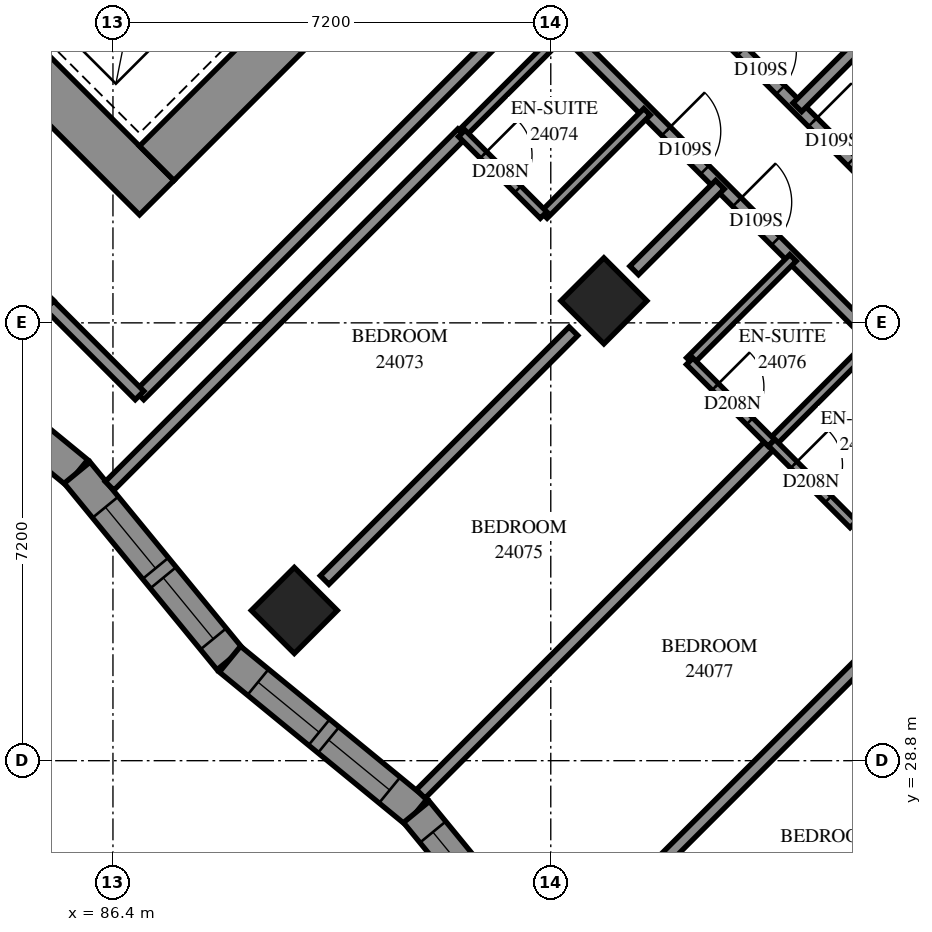
"""IFC4 building model, lengths in metres.
Left out: names, types, materials, properties, quantities, classifications, styles, units other than length and angle.
Written with IfcOpenShell. Run it as: python <this file> out.ifc"""

import sys

from ifc_helpers import new_model, si_unit, direction, frame, frame_2d, origin, origin_2d, place, context, subcontext, project, spatial, polyline, rectangle, outline, extrude, element, fill, save


model = new_model("IFC4")
c1 = context("Model", 3, precision=1e-05, world=origin(), true_north=direction((0.0, 1.0)))
c2 = subcontext(c1, "Body", "Model", "MODEL_VIEW")
j1 = project(units=[si_unit("LENGTHUNIT", "METRE"), si_unit("PLANEANGLEUNIT", "RADIAN")], contexts=[c1])
p1 = place(None, origin())
s1 = spatial("IfcSite", under=j1, at=p1, CompositionType="ELEMENT")
p2 = place(p1, origin())
s2 = spatial("IfcBuilding", under=s1, at=p2, CompositionType="ELEMENT")
p3 = place(p2, frame((0.0, 0.0, 91.4)))
s3 = spatial("IfcBuildingStorey", under=s2, at=p3, CompositionType="ELEMENT", Elevation=91.4)
for number, where, z_axis, x_axis in (
    (1, (94.474, 36.362, 0.0), (0.0, 0.0, 1.0), (0.707, -0.707, 0.0)),
    (2, (89.382, 31.271, 0.0), (0.0, 0.0, 1.0), (0.707, -0.707, 0.0)),
):
    element("IfcColumn", number, at=place(p3, frame(where, z_axis=z_axis, x_axis=x_axis)), inside=s3, PredefinedType="COLUMN", context=c2, shape_type="SweptSolid", body=[
        extrude(rectangle(XDim=1.0, YDim=1.0, at=origin_2d()), origin(), (0.0, 0.0, 1.0), 3.1),
    ])
p4 = place(p3, frame((75.806, 49.373, -0.3), z_axis=(0.0, 0.0, 1.0), x_axis=(0.7071067812, -0.7071067812, 0.0)))
e3 = element("IfcWall", 3, at=p4, inside=s3, PredefinedType="SHEAR", context=c2, shape_type="SweptSolid", body=[
    extrude(rectangle(XDim=16.0, YDim=0.8, at=frame_2d((8.0, 0.0))), origin(), (0.0, 0.0, 1.0), 2.7),
])
p5 = place(p3, frame((87.12, 38.625, -0.3), z_axis=(0.0, 0.0, 1.0), x_axis=(0.7071067812, 0.7071067812, 0.0)))
e4 = element("IfcWall", 4, at=p5, inside=s3, PredefinedType="SHEAR", context=c2, shape_type="SweptSolid", body=[
    extrude(rectangle(XDim=14.4, YDim=0.8, at=frame_2d((7.2, 0.0))), origin(), (0.0, 0.0, 1.0), 2.7),
])
p6 = place(p5, frame((4.55, 0.0, 0.3)))
e5 = element("IfcOpeningElement", 5, at=p6, cuts=e4, PredefinedType="OPENING", context=c2, shape_type="SweptSolid", body=[
    extrude(rectangle(XDim=1.1, YDim=2.1, at=frame_2d((0.55, 1.05))), frame((0.0, 0.41, 0.0), z_axis=(0.0, -1.0, 0.0), x_axis=(1.0, 0.0, 0.0)), (0.0, 0.0, 1.0), 0.82),
])
p7 = place(p5, frame((11.35, 0.0, 0.3)))
e6 = element("IfcOpeningElement", 6, at=p7, cuts=e4, PredefinedType="OPENING", context=c2, shape_type="SweptSolid", body=[
    extrude(rectangle(XDim=1.1, YDim=2.1, at=frame_2d((0.55, 1.05))), frame((0.0, 0.41, 0.0), z_axis=(0.0, -1.0, 0.0), x_axis=(1.0, 0.0, 0.0)), (0.0, 0.0, 1.0), 0.82),
])
p8 = place(p3, frame((82.745, 36.049, 0.0), z_axis=(0.0, 0.0, 1.0), x_axis=(0.7733872397, -0.6339338904, 0.0)))
e7 = element("IfcWall", 7, at=p8, inside=s3, PredefinedType="SOLIDWALL", context=c2, shape_type="SweptSolid", body=[
    extrude(outline(polyline([(-0.027, -0.275), (3.938, -0.275), (3.992, 0.275), (0.027, 0.275), (-0.027, -0.275)])), origin(), (0.0, 0.0, 1.0), 3.1),
])
p9 = place(p8, frame((1.721, 0.0, 0.5)))
e8 = element("IfcOpeningElement", 8, at=p9, cuts=e7, PredefinedType="OPENING", context=c2, shape_type="SweptSolid", body=[
    extrude(rectangle(XDim=1.2, YDim=2.45, at=frame_2d((0.6, 1.225))), frame((0.0, 0.285, 0.0), z_axis=(0.0, -1.0, 0.0), x_axis=(1.0, 0.0, 0.0)), (0.0, 0.0, 1.0), 0.57),
])
p10 = place(p3, frame((85.811, 33.536, 0.0), z_axis=(0.0, 0.0, 1.0), x_axis=(0.6339462564, -0.7733771033, 0.0)))
e9 = element("IfcWall", 9, at=p10, inside=s3, PredefinedType="SOLIDWALL", context=c2, shape_type="SweptSolid", body=[
    extrude(outline(polyline([(0.027, -0.275), (3.992, -0.275), (3.938, 0.275), (-0.027, 0.275), (0.027, -0.275)])), origin(), (0.0, 0.0, 1.0), 3.1),
])
p11 = place(p10, frame((0.734, 0.0, 0.5)))
e10 = element("IfcOpeningElement", 10, at=p11, cuts=e9, PredefinedType="OPENING", context=c2, shape_type="SweptSolid", body=[
    extrude(rectangle(XDim=1.3, YDim=2.45, at=frame_2d((0.65, 1.225))), frame((0.0, 0.285, 0.0), z_axis=(0.0, -1.0, 0.0), x_axis=(1.0, 0.0, 0.0)), (0.0, 0.0, 1.0), 0.57),
])
p12 = place(p10, frame((2.233, 0.0, 0.5)))
e11 = element("IfcOpeningElement", 11, at=p12, cuts=e9, PredefinedType="OPENING", context=c2, shape_type="SweptSolid", body=[
    extrude(rectangle(XDim=1.3, YDim=2.45, at=frame_2d((0.65, 1.225))), frame((0.0, 0.285, 0.0), z_axis=(0.0, -1.0, 0.0), x_axis=(1.0, 0.0, 0.0)), (0.0, 0.0, 1.0), 0.57),
])
p13 = place(p3, frame((88.324, 30.47, 0.0), z_axis=(0.0, 0.0, 1.0), x_axis=(0.7733872397, -0.6339338904, 0.0)))
e12 = element("IfcWall", 12, at=p13, inside=s3, PredefinedType="SOLIDWALL", context=c2, shape_type="SweptSolid", body=[
    extrude(outline(polyline([(-0.027, -0.275), (3.938, -0.275), (3.992, 0.275), (0.027, 0.275), (-0.027, -0.275)])), origin(), (0.0, 0.0, 1.0), 3.1),
])
p14 = place(p13, frame((0.596, 0.0, 0.5)))
e13 = element("IfcOpeningElement", 13, at=p14, cuts=e12, PredefinedType="OPENING", context=c2, shape_type="SweptSolid", body=[
    extrude(rectangle(XDim=1.3, YDim=2.45, at=frame_2d((0.65, 1.225))), frame((0.0, 0.285, 0.0), z_axis=(0.0, -1.0, 0.0), x_axis=(1.0, 0.0, 0.0)), (0.0, 0.0, 1.0), 0.57),
])
p15 = place(p13, frame((2.096, 0.0, 0.5)))
e14 = element("IfcOpeningElement", 14, at=p15, cuts=e12, PredefinedType="OPENING", context=c2, shape_type="SweptSolid", body=[
    extrude(rectangle(XDim=1.3, YDim=2.45, at=frame_2d((0.65, 1.225))), frame((0.0, 0.285, 0.0), z_axis=(0.0, -1.0, 0.0), x_axis=(1.0, 0.0, 0.0)), (0.0, 0.0, 1.0), 0.57),
])
p16 = place(p3, frame((91.391, 27.956, 0.0), z_axis=(0.0, 0.0, 1.0), x_axis=(0.633918804, -0.7733996056, 0.0)))
e15 = element("IfcWall", 15, at=p16, inside=s3, PredefinedType="SOLIDWALL", context=c2, shape_type="SweptSolid", body=[
    extrude(outline(polyline([(0.027, -0.275), (3.992, -0.275), (3.938, 0.275), (-0.027, 0.275), (0.027, -0.275)])), origin(), (0.0, 0.0, 1.0), 3.1),
])
p17 = place(p16, frame((0.426, 0.0, 0.5)))
e16 = element("IfcOpeningElement", 16, at=p17, cuts=e15, PredefinedType="OPENING", context=c2, shape_type="SweptSolid", body=[
    extrude(rectangle(XDim=1.3, YDim=2.45, at=frame_2d((0.65, 1.225))), frame((0.0, 0.285, 0.0), z_axis=(0.0, -1.0, 0.0), x_axis=(1.0, 0.0, 0.0)), (0.0, 0.0, 1.0), 0.57),
])
p18 = place(p16, frame((1.927, 0.0, 0.5)))
e17 = element("IfcOpeningElement", 17, at=p18, cuts=e15, PredefinedType="OPENING", context=c2, shape_type="SweptSolid", body=[
    extrude(rectangle(XDim=1.3, YDim=2.45, at=frame_2d((0.65, 1.225))), frame((0.0, 0.285, 0.0), z_axis=(0.0, -1.0, 0.0), x_axis=(1.0, 0.0, 0.0)), (0.0, 0.0, 1.0), 0.57),
])
p19 = place(p3, frame((93.339, 41.309, 0.0), z_axis=(0.0, 0.0, 1.0), x_axis=(0.7071067812, -0.7071067812, 0.0)))
e18 = element("IfcWall", 18, at=p19, inside=s3, PredefinedType="PARTITIONING", context=c2, shape_type="SweptSolid", body=[
    extrude(rectangle(XDim=18.702, YDim=0.2, at=frame_2d((9.351, 0.0))), origin(), (0.0, 0.0, 1.0), 3.1),
])
p20 = place(p19, frame((3.05, 0.0, 0.0)))
e19 = element("IfcOpeningElement", 19, at=p20, cuts=e18, PredefinedType="OPENING", context=c2, shape_type="SweptSolid", body=[
    extrude(rectangle(XDim=0.9, YDim=2.1, at=frame_2d((0.45, 1.05))), frame((0.0, 0.11, 0.0), z_axis=(0.0, -1.0, 0.0), x_axis=(1.0, 0.0, 0.0)), (0.0, 0.0, 1.0), 0.22),
])
p21 = place(p19, frame((4.7, 0.0, 0.0)))
e20 = element("IfcOpeningElement", 20, at=p21, cuts=e18, PredefinedType="OPENING", context=c2, shape_type="SweptSolid", body=[
    extrude(rectangle(XDim=0.9, YDim=2.1, at=frame_2d((0.45, 1.05))), frame((0.0, 0.11, 0.0), z_axis=(0.0, -1.0, 0.0), x_axis=(1.0, 0.0, 0.0)), (0.0, 0.0, 1.0), 0.22),
])
p22 = place(p19, frame((10.149, 0.0, 0.0)))
e21 = element("IfcOpeningElement", 21, at=p22, cuts=e18, PredefinedType="OPENING", context=c2, shape_type="SweptSolid", body=[
    extrude(rectangle(XDim=0.9, YDim=2.1, at=frame_2d((0.45, 1.05))), frame((0.0, 0.11, 0.0), z_axis=(0.0, -1.0, 0.0), x_axis=(1.0, 0.0, 0.0)), (0.0, 0.0, 1.0), 0.22),
])
p23 = place(p19, frame((11.9, 0.0, 0.0)))
e22 = element("IfcOpeningElement", 22, at=p23, cuts=e18, PredefinedType="OPENING", context=c2, shape_type="SweptSolid", body=[
    extrude(rectangle(XDim=0.9, YDim=2.1, at=frame_2d((0.45, 1.05))), frame((0.0, 0.11, 0.0), z_axis=(0.0, -1.0, 0.0), x_axis=(1.0, 0.0, 0.0)), (0.0, 0.0, 1.0), 0.22),
])
p24 = place(p19, frame((17.45, 0.0, 0.0)))
e23 = element("IfcOpeningElement", 23, at=p24, cuts=e18, PredefinedType="OPENING", context=c2, shape_type="SweptSolid", body=[
    extrude(rectangle(XDim=0.9, YDim=2.1, at=frame_2d((0.45, 1.05))), frame((0.0, 0.11, 0.0), z_axis=(0.0, -1.0, 0.0), x_axis=(1.0, 0.0, 0.0)), (0.0, 0.0, 1.0), 0.22),
])
p25 = place(p3, frame((86.835, 34.806, 0.0), z_axis=(0.0, 0.0, 1.0), x_axis=(0.7071067812, 0.7071067812, 0.0)))
e24 = element("IfcWall", 24, at=p25, inside=s3, PredefinedType="PARTITIONING", context=c2, shape_type="SweptSolid", body=[
    extrude(rectangle(XDim=9.201, YDim=0.2, at=frame_2d((4.601, 0.0))), origin(), (0.0, 0.0, 1.0), 3.1),
])
p26 = place(p3, frame((96.501, 23.117, 0.0), z_axis=(0.0, 0.0, 1.0), x_axis=(0.7071128537, 0.7071007086, 0.0)))
e25 = element("IfcWall", 25, at=p26, inside=s3, PredefinedType="PARTITIONING", context=c2, shape_type="SweptSolid", body=[
    extrude(rectangle(XDim=8.234, YDim=0.2, at=frame_2d((4.117, 0.0))), origin(), (0.0, 0.0, 1.0), 3.1),
])
p27 = place(p3, frame((86.345, 33.319, 0.0), z_axis=(0.0, 0.0, 1.0), x_axis=(0.7069848221, 0.7072287193, 0.0)))
e26 = element("IfcWall", 26, at=p27, inside=s3, PredefinedType="PARTITIONING", context=c2, shape_type="SweptSolid", body=[
    extrude(rectangle(XDim=8.2, YDim=0.2, at=frame_2d((4.1, 0.0))), origin(), (0.0, 0.0, 1.0), 3.1),
])
p28 = place(p3, frame((91.462, 28.254, 0.0), z_axis=(0.0, 0.0, 1.0), x_axis=(0.7072292685, 0.7069842727, 0.0)))
e27 = element("IfcWall", 27, at=p28, inside=s3, PredefinedType="PARTITIONING", context=c2, shape_type="SweptSolid", body=[
    extrude(rectangle(XDim=8.163, YDim=0.2, at=frame_2d((4.082, 0.0))), origin(), (0.0, 0.0, 1.0), 3.1),
])
p29 = place(p3, frame((94.62, 42.587, 0.0), z_axis=(0.0, 0.0, 1.0), x_axis=(0.7071067812, -0.7071067812, 0.0)))
e28 = element("IfcWall", 28, at=p29, inside=s3, PredefinedType="PARTITIONING", context=c2, shape_type="SweptSolid", body=[
    extrude(rectangle(XDim=7.9, YDim=0.2, at=frame_2d((3.95, 0.0))), origin(), (0.0, 0.0, 1.0), 3.1),
])
p30 = place(p29, frame((2.998, 0.0, 0.0)))
e29 = element("IfcOpeningElement", 29, at=p30, cuts=e28, PredefinedType="OPENING", context=c2, shape_type="SweptSolid", body=[
    extrude(rectangle(XDim=0.9, YDim=2.1, at=frame_2d((0.45, 1.05))), frame((0.0, 0.11, 0.0), z_axis=(0.0, -1.0, 0.0), x_axis=(1.0, 0.0, 0.0)), (0.0, 0.0, 1.0), 0.22),
])
p31 = place(p29, frame((4.649, 0.0, 0.0)))
e30 = element("IfcOpeningElement", 30, at=p31, cuts=e28, PredefinedType="OPENING", context=c2, shape_type="SweptSolid", body=[
    extrude(rectangle(XDim=0.9, YDim=2.1, at=frame_2d((0.45, 1.05))), frame((0.0, 0.11, 0.0), z_axis=(0.0, -1.0, 0.0), x_axis=(1.0, 0.0, 0.0)), (0.0, 0.0, 1.0), 0.22),
])
p32 = place(p3, frame((89.881, 31.771, 0.0), z_axis=(0.0, 0.0, 1.0), x_axis=(0.7071067812, 0.7071067812, 0.0)))
e31 = element("IfcWall", 31, at=p32, inside=s3, PredefinedType="PARTITIONING", context=c2, shape_type="SweptSolid", body=[
    extrude(rectangle(XDim=5.787, YDim=0.2, at=frame_2d((2.893, 0.0))), origin(), (0.0, 0.0, 1.0), 3.1),
])
p33 = place(p3, frame((94.973, 26.681, 0.0), z_axis=(0.0, 0.0, 1.0), x_axis=(0.7071067812, 0.7071067812, 0.0)))
e32 = element("IfcWall", 32, at=p33, inside=s3, PredefinedType="PARTITIONING", context=c2, shape_type="SweptSolid", body=[
    extrude(rectangle(XDim=5.784, YDim=0.2, at=frame_2d((2.892, 0.0))), origin(), (0.0, 0.0, 1.0), 3.1),
])
p34 = place(p3, frame((98.573, 32.685, 0.0), z_axis=(0.0, 0.0, 1.0), x_axis=(0.7071067812, 0.7071067812, 0.0)))
e33 = element("IfcWall", 33, at=p34, inside=s3, PredefinedType="PARTITIONING", context=c2, shape_type="SweptSolid", body=[
    extrude(rectangle(XDim=2.401, YDim=0.15, at=frame_2d((1.201, 0.0))), origin(), (0.0, 0.0, 1.0), 3.1),
])
for number, where, z_axis, x_axis in (
    (34, (92.143, 39.117, 0.0), (0.0, 0.0, 1.0), (0.708, 0.707, 0.0)),
    (35, (93.487, 37.773, 0.0), (0.0, 0.0, 1.0), (0.707, 0.708, 0.0)),
    (36, (97.234, 34.026, 0.0), (0.0, 0.0, 1.0), (0.707, 0.708, 0.0)),
):
    element("IfcWall", number, at=place(p3, frame(where, z_axis=z_axis, x_axis=x_axis)), inside=s3, PredefinedType="PARTITIONING", context=c2, shape_type="SweptSolid", body=[
        extrude(rectangle(XDim=2.4, YDim=0.15, at=frame_2d((1.2, 0.0))), origin(), (0.0, 0.0, 1.0), 3.1),
    ])
p35 = place(p3, frame((95.887, 35.373, 0.0), z_axis=(0.0, 0.0, 1.0), x_axis=(0.7071067812, 0.7071067812, 0.0)))
e37 = element("IfcWall", 37, at=p35, inside=s3, PredefinedType="PARTITIONING", context=c2, shape_type="SweptSolid", body=[
    extrude(rectangle(XDim=2.398, YDim=0.15, at=frame_2d((1.199, 0.0))), origin(), (0.0, 0.0, 1.0), 3.1),
])
p36 = place(p3, frame((85.353, 36.293, 0.0), z_axis=(0.0, 0.0, 1.0), x_axis=(0.7066304548, -0.7075827869, 0.0)))
e38 = element("IfcWall", 38, at=p36, inside=s3, PredefinedType="PARTITIONING", context=c2, shape_type="SweptSolid", body=[
    extrude(rectangle(XDim=2.1, YDim=0.2, at=frame_2d((1.05, 0.0))), origin(), (0.0, 0.0, 1.0), 3.1),
])
for number, where, z_axis, x_axis in (
    (39, (97.655, 39.545, 0.0), (0.0, 0.0, 1.0), (0.707, 0.707, 0.0)),
    (40, (94.972, 36.862, 0.0), (0.0, 0.0, 1.0), (0.707, 0.707, 0.0)),
):
    element("IfcWall", number, at=place(p3, frame(where, z_axis=z_axis, x_axis=x_axis)), inside=s3, PredefinedType="PARTITIONING", context=c2, shape_type="SweptSolid", body=[
        extrude(rectangle(XDim=1.994, YDim=0.2, at=frame_2d((0.997, 0.0))), origin(), (0.0, 0.0, 1.0), 3.1),
    ])
p37 = place(p3, frame((95.885, 35.369, 0.0), z_axis=(0.0, 0.0, 1.0), x_axis=(0.7071067812, -0.7071067812, 0.0)))
e41 = element("IfcWall", 41, at=p37, inside=s3, PredefinedType="PARTITIONING", context=c2, shape_type="SweptSolid", body=[
    extrude(rectangle(XDim=1.901, YDim=0.15, at=frame_2d((0.95, 0.0))), origin(), (0.0, 0.0, 1.0), 3.1),
])
p38 = place(p37, frame((0.595, 0.0, 0.0)))
e42 = element("IfcOpeningElement", 42, at=p38, cuts=e41, PredefinedType="OPENING", context=c2, shape_type="SweptSolid", body=[
    extrude(rectangle(XDim=0.8, YDim=2.1, at=frame_2d((0.4, 1.05))), frame((0.0, 0.085, 0.0), z_axis=(0.0, -1.0, 0.0), x_axis=(1.0, 0.0, 0.0)), (0.0, 0.0, 1.0), 0.17),
])
p39 = place(p3, frame((92.137, 39.117, 0.0), z_axis=(0.0, 0.0, 1.0), x_axis=(0.7071067812, -0.7071067812, 0.0)))
e43 = element("IfcWall", 43, at=p39, inside=s3, PredefinedType="PARTITIONING", context=c2, shape_type="SweptSolid", body=[
    extrude(rectangle(XDim=1.901, YDim=0.15, at=frame_2d((0.95, 0.0))), origin(), (0.0, 0.0, 1.0), 3.1),
])
p40 = place(p39, frame((0.502, 0.0, 0.0)))
e44 = element("IfcOpeningElement", 44, at=p40, cuts=e43, PredefinedType="OPENING", context=c2, shape_type="SweptSolid", body=[
    extrude(rectangle(XDim=0.8, YDim=2.1, at=frame_2d((0.4, 1.05))), frame((0.0, 0.085, 0.0), z_axis=(0.0, -1.0, 0.0), x_axis=(1.0, 0.0, 0.0)), (0.0, 0.0, 1.0), 0.17),
])
p41 = place(p3, frame((97.233, 34.029, 0.0), z_axis=(0.0, 0.0, 1.0), x_axis=(0.7065800724, -0.7076330979, 0.0)))
e45 = element("IfcWall", 45, at=p41, inside=s3, PredefinedType="PARTITIONING", context=c2, shape_type="SweptSolid", body=[
    extrude(rectangle(XDim=1.899, YDim=0.15, at=frame_2d((0.95, 0.0))), origin(), (0.0, 0.0, 1.0), 3.1),
])
p42 = place(p41, frame((0.515, 0.0, 0.0)))
e46 = element("IfcOpeningElement", 46, at=p42, cuts=e45, PredefinedType="OPENING", context=c2, shape_type="SweptSolid", body=[
    extrude(rectangle(XDim=0.8, YDim=2.1, at=frame_2d((0.4, 1.05))), frame((0.0, 0.085, 0.0), z_axis=(0.0, -1.0, 0.0), x_axis=(1.0, 0.0, 0.0)), (0.0, 0.0, 1.0), 0.17),
])
p43 = place(p3, frame((84.795, 36.855, 0.0), z_axis=(0.0, 0.0, 1.0), x_axis=(0.7071067812, -0.7071067812, 0.0)))
e47 = element("IfcWall", 47, at=p43, inside=s3, PredefinedType="PARTITIONING", context=c2, shape_type="SweptSolid", body=[
    extrude(rectangle(XDim=0.792, YDim=0.2, at=frame_2d((0.396, 0.0))), origin(), (0.0, 0.0, 1.0), 3.1),
])
p44 = place(p11, origin())
e48 = element("IfcWindow", 48, at=p44, inside=s3, PartitioningType="SINGLE_PANEL", PredefinedType="WINDOW", context=c2, shape_type="SweptSolid", body=[
    extrude(rectangle(XDim=1.3, YDim=2.45, at=frame_2d((0.65, 1.225))), frame((0.0, 0.155, 0.0), z_axis=(0.0, -1.0, 0.0), x_axis=(1.0, 0.0, 0.0)), (0.0, 0.0, 1.0), 0.06),
])
fill(e10, e48)
p45 = place(p12, origin())
e49 = element("IfcWindow", 49, at=p45, inside=s3, PartitioningType="SINGLE_PANEL", PredefinedType="WINDOW", context=c2, shape_type="SweptSolid", body=[
    extrude(rectangle(XDim=1.3, YDim=2.45, at=frame_2d((0.65, 1.225))), frame((0.0, 0.155, 0.0), z_axis=(0.0, -1.0, 0.0), x_axis=(1.0, 0.0, 0.0)), (0.0, 0.0, 1.0), 0.06),
])
fill(e11, e49)
p46 = place(p14, origin())
e50 = element("IfcWindow", 50, at=p46, inside=s3, PartitioningType="SINGLE_PANEL", PredefinedType="WINDOW", context=c2, shape_type="SweptSolid", body=[
    extrude(rectangle(XDim=1.3, YDim=2.45, at=frame_2d((0.65, 1.225))), frame((0.0, 0.155, 0.0), z_axis=(0.0, -1.0, 0.0), x_axis=(1.0, 0.0, 0.0)), (0.0, 0.0, 1.0), 0.06),
])
fill(e13, e50)
p47 = place(p15, origin())
e51 = element("IfcWindow", 51, at=p47, inside=s3, PartitioningType="SINGLE_PANEL", PredefinedType="WINDOW", context=c2, shape_type="SweptSolid", body=[
    extrude(rectangle(XDim=1.3, YDim=2.45, at=frame_2d((0.65, 1.225))), frame((0.0, 0.155, 0.0), z_axis=(0.0, -1.0, 0.0), x_axis=(1.0, 0.0, 0.0)), (0.0, 0.0, 1.0), 0.06),
])
fill(e14, e51)
p48 = place(p17, origin())
e52 = element("IfcWindow", 52, at=p48, inside=s3, PartitioningType="SINGLE_PANEL", PredefinedType="WINDOW", context=c2, shape_type="SweptSolid", body=[
    extrude(rectangle(XDim=1.3, YDim=2.45, at=frame_2d((0.65, 1.225))), frame((0.0, 0.155, 0.0), z_axis=(0.0, -1.0, 0.0), x_axis=(1.0, 0.0, 0.0)), (0.0, 0.0, 1.0), 0.06),
])
fill(e16, e52)
p49 = place(p30, origin())
e53 = element("IfcDoor", 53, at=p49, inside=s3, OperationType="SINGLE_SWING_RIGHT", PredefinedType="DOOR", context=c2, shape_type="SweptSolid", body=[
    extrude(rectangle(XDim=0.9, YDim=2.1, at=frame_2d((0.45, 1.05))), frame((0.0, 0.025, 0.0), z_axis=(0.0, -1.0, 0.0), x_axis=(1.0, 0.0, 0.0)), (0.0, 0.0, 1.0), 0.05),
])
fill(e29, e53)
p50 = place(p31, origin())
e54 = element("IfcDoor", 54, at=p50, inside=s3, OperationType="SINGLE_SWING_LEFT", PredefinedType="DOOR", context=c2, shape_type="SweptSolid", body=[
    extrude(rectangle(XDim=0.9, YDim=2.1, at=frame_2d((0.45, 1.05))), frame((0.0, 0.025, 0.0), z_axis=(0.0, -1.0, 0.0), x_axis=(1.0, 0.0, 0.0)), (0.0, 0.0, 1.0), 0.05),
])
fill(e30, e54)
p51 = place(p20, origin())
e55 = element("IfcDoor", 55, at=p51, inside=s3, OperationType="SINGLE_SWING_LEFT", PredefinedType="DOOR", context=c2, shape_type="SweptSolid", body=[
    extrude(rectangle(XDim=0.9, YDim=2.1, at=frame_2d((0.45, 1.05))), frame((0.0, 0.025, 0.0), z_axis=(0.0, -1.0, 0.0), x_axis=(1.0, 0.0, 0.0)), (0.0, 0.0, 1.0), 0.05),
])
fill(e19, e55)
p52 = place(p40, origin())
e56 = element("IfcDoor", 56, at=p52, inside=s3, OperationType="SINGLE_SWING_RIGHT", PredefinedType="DOOR", context=c2, shape_type="SweptSolid", body=[
    extrude(rectangle(XDim=0.8, YDim=2.1, at=frame_2d((0.4, 1.05))), frame((0.0, 0.025, 0.0), z_axis=(0.0, -1.0, 0.0), x_axis=(1.0, 0.0, 0.0)), (0.0, 0.0, 1.0), 0.05),
])
fill(e44, e56)
p53 = place(p21, origin())
e57 = element("IfcDoor", 57, at=p53, inside=s3, OperationType="SINGLE_SWING_RIGHT", PredefinedType="DOOR", context=c2, shape_type="SweptSolid", body=[
    extrude(rectangle(XDim=0.9, YDim=2.1, at=frame_2d((0.45, 1.05))), frame((0.0, 0.025, 0.0), z_axis=(0.0, -1.0, 0.0), x_axis=(1.0, 0.0, 0.0)), (0.0, 0.0, 1.0), 0.05),
])
fill(e20, e57)
p54 = place(p38, origin())
e58 = element("IfcDoor", 58, at=p54, inside=s3, OperationType="SINGLE_SWING_RIGHT", PredefinedType="DOOR", context=c2, shape_type="SweptSolid", body=[
    extrude(rectangle(XDim=0.8, YDim=2.1, at=frame_2d((0.4, 1.05))), frame((0.0, 0.025, 0.0), z_axis=(0.0, -1.0, 0.0), x_axis=(1.0, 0.0, 0.0)), (0.0, 0.0, 1.0), 0.05),
])
fill(e42, e58)
p55 = place(p42, origin())
e59 = element("IfcDoor", 59, at=p55, inside=s3, OperationType="SINGLE_SWING_RIGHT", PredefinedType="DOOR", context=c2, shape_type="SweptSolid", body=[
    extrude(rectangle(XDim=0.8, YDim=2.1, at=frame_2d((0.4, 1.05))), frame((0.0, 0.025, 0.0), z_axis=(0.0, -1.0, 0.0), x_axis=(1.0, 0.0, 0.0)), (0.0, 0.0, 1.0), 0.05),
])
fill(e46, e59)
save(model, sys.argv[1])
